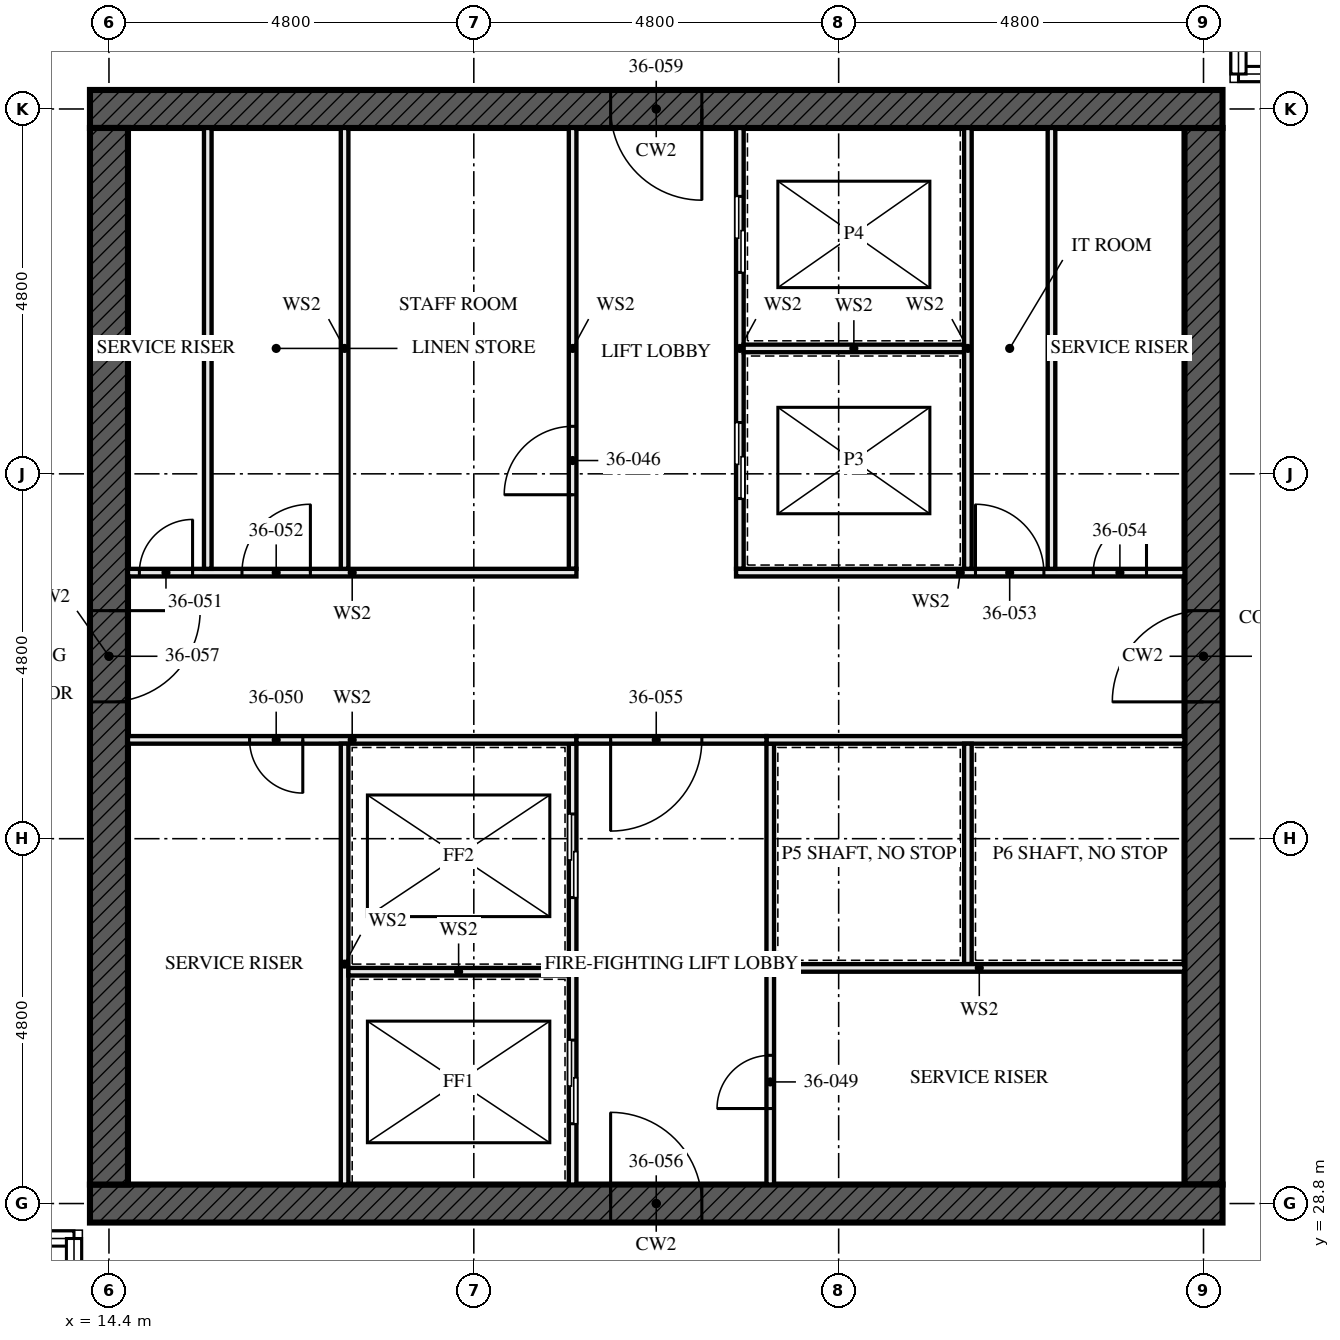
"""IFC4 building model, lengths in metres.
Left out: names, types, materials, properties, quantities, classifications, styles, units other than length and angle.
Written with IfcOpenShell. Run it as: python <this file> out.ifc"""

import sys

from ifc_helpers import new_model, si_unit, direction, frame, frame_2d, origin, place, context, subcontext, project, spatial, rectangle, extrude, element, fill, save


model = new_model("IFC4")
c1 = context("Model", 3, precision=1e-05, world=origin(), true_north=direction((0.0, 1.0)))
c2 = subcontext(c1, "Body", "Model", "MODEL_VIEW")
j1 = project(units=[si_unit("LENGTHUNIT", "METRE"), si_unit("PLANEANGLEUNIT", "RADIAN")], contexts=[c1])
p1 = place(None, origin())
s1 = spatial("IfcSite", under=j1, at=p1, CompositionType="ELEMENT")
p2 = place(p1, origin())
s2 = spatial("IfcBuilding", under=s1, at=p2, CompositionType="ELEMENT")
p3 = place(p2, frame((0.0, 0.0, 133.0)))
s3 = spatial("IfcBuildingStorey", under=s2, at=p3, CompositionType="ELEMENT", Elevation=133.0)
p4 = place(p3, frame((14.15, 28.8, -0.17), z_axis=(0.0, 0.0, 1.0), x_axis=(1.0, 0.0, 0.0)))
e1 = element("IfcWall", 1, at=p4, inside=s3, PredefinedType="SHEAR", context=c2, shape_type="SweptSolid", body=[
    extrude(rectangle(XDim=14.9, YDim=0.5, at=frame_2d((7.45, 0.0))), origin(), (0.0, 0.0, 1.0), 3.42),
])
p5 = place(p4, frame((6.85, 0.0, 0.17)))
e2 = element("IfcOpeningElement", 2, at=p5, cuts=e1, PredefinedType="OPENING", context=c2, shape_type="SweptSolid", body=[
    extrude(rectangle(XDim=1.2, YDim=2.1, at=frame_2d((0.6, 1.05))), frame((0.0, 0.26, 0.0), z_axis=(0.0, -1.0, 0.0), x_axis=(1.0, 0.0, 0.0)), (0.0, 0.0, 1.0), 0.521),
])
p6 = place(p3, frame((29.05, 43.2, -0.17), z_axis=(0.0, 0.0, 1.0), x_axis=(-1.0, 0.0, 0.0)))
e3 = element("IfcWall", 3, at=p6, inside=s3, PredefinedType="SHEAR", context=c2, shape_type="SweptSolid", body=[
    extrude(rectangle(XDim=14.9, YDim=0.5, at=frame_2d((7.45, 0.0))), origin(), (0.0, 0.0, 1.0), 3.42),
])
p7 = place(p6, frame((6.85, 0.0, 0.17)))
e4 = element("IfcOpeningElement", 4, at=p7, cuts=e3, PredefinedType="OPENING", context=c2, shape_type="SweptSolid", body=[
    extrude(rectangle(XDim=1.2, YDim=2.1, at=frame_2d((0.6, 1.05))), frame((0.0, 0.26, 0.0), z_axis=(0.0, -1.0, 0.0), x_axis=(1.0, 0.0, 0.0)), (0.0, 0.0, 1.0), 0.521),
])
p8 = place(p3, frame((14.4, 42.95, -0.17), z_axis=(0.0, 0.0, 1.0), x_axis=(0.0, -1.0, 0.0)))
e5 = element("IfcWall", 5, at=p8, inside=s3, PredefinedType="SHEAR", context=c2, shape_type="SweptSolid", body=[
    extrude(rectangle(XDim=13.9, YDim=0.5, at=frame_2d((6.95, 0.0))), origin(), (0.0, 0.0, 1.0), 3.42),
])
p9 = place(p8, frame((6.35, 0.0, 0.17)))
e6 = element("IfcOpeningElement", 6, at=p9, cuts=e5, PredefinedType="OPENING", context=c2, shape_type="SweptSolid", body=[
    extrude(rectangle(XDim=1.2, YDim=2.1, at=frame_2d((0.6, 1.05))), frame((0.0, 0.26, 0.0), z_axis=(0.0, -1.0, 0.0), x_axis=(1.0, 0.0, 0.0)), (0.0, 0.0, 1.0), 0.521),
])
p10 = place(p3, frame((28.8, 29.05, -0.17), z_axis=(0.0, 0.0, 1.0), x_axis=(0.0, 1.0, 0.0)))
e7 = element("IfcWall", 7, at=p10, inside=s3, PredefinedType="SHEAR", context=c2, shape_type="SweptSolid", body=[
    extrude(rectangle(XDim=13.9, YDim=0.5, at=frame_2d((6.95, 0.0))), origin(), (0.0, 0.0, 1.0), 3.42),
])
p11 = place(p10, frame((6.35, 0.0, 0.17)))
e8 = element("IfcOpeningElement", 8, at=p11, cuts=e7, PredefinedType="OPENING", context=c2, shape_type="SweptSolid", body=[
    extrude(rectangle(XDim=1.2, YDim=2.1, at=frame_2d((0.6, 1.05))), frame((0.0, 0.26, 0.0), z_axis=(0.0, -1.0, 0.0), x_axis=(1.0, 0.0, 0.0)), (0.0, 0.0, 1.0), 0.521),
])
for number, where, z_axis, x_axis in (
    (9, (15.7, 37.15, 0.0), (0.0, 0.0, 1.0), (0.0, 1.0, 0.0)),
    (10, (26.8, 37.15, 0.0), (0.0, 0.0, 1.0), (0.0, 1.0, 0.0)),
):
    element("IfcWall", number, at=place(p3, frame(where, z_axis=z_axis, x_axis=x_axis)), inside=s3, PredefinedType="SOLIDWALL", context=c2, shape_type="SweptSolid", body=[
        extrude(rectangle(XDim=5.8, YDim=0.1, at=frame_2d((2.9, 0.0))), origin(), (0.0, 0.0, 1.0), 3.25),
    ])
p12 = place(p3, frame((20.5, 29.05, 0.0), z_axis=(0.0, 0.0, 1.0), x_axis=(0.0, 1.0, 0.0)))
e11 = element("IfcWall", 11, at=p12, inside=s3, PredefinedType="SOLIDWALL", context=c2, shape_type="SweptSolid", body=[
    extrude(rectangle(XDim=5.8, YDim=0.1, at=frame_2d((2.9, 0.0))), origin(), (0.0, 0.0, 1.0), 3.25),
])
p13 = place(p12, frame((0.8, 0.0, 0.0)))
e12 = element("IfcOpeningElement", 12, at=p13, cuts=e11, PredefinedType="OPENING", context=c2, shape_type="SweptSolid", body=[
    extrude(rectangle(XDim=1.1, YDim=2.3, at=frame_2d((0.55, 1.15))), frame((0.0, 0.061, 0.0), z_axis=(0.0, -1.0, 0.0), x_axis=(1.0, 0.0, 0.0)), (0.0, 0.0, 1.0), 0.121),
])
p14 = place(p12, frame((3.775, 0.0, 0.0)))
e13 = element("IfcOpeningElement", 13, at=p14, cuts=e11, PredefinedType="OPENING", context=c2, shape_type="SweptSolid", body=[
    extrude(rectangle(XDim=1.1, YDim=2.3, at=frame_2d((0.55, 1.15))), frame((0.0, 0.061, 0.0), z_axis=(0.0, -1.0, 0.0), x_axis=(1.0, 0.0, 0.0)), (0.0, 0.0, 1.0), 0.121),
])
p15 = place(p3, frame((20.5, 37.15, 0.0), z_axis=(0.0, 0.0, 1.0), x_axis=(0.0, 1.0, 0.0)))
e14 = element("IfcWall", 14, at=p15, inside=s3, PredefinedType="SOLIDWALL", context=c2, shape_type="SweptSolid", body=[
    extrude(rectangle(XDim=5.8, YDim=0.1, at=frame_2d((2.9, 0.0))), origin(), (0.0, 0.0, 1.0), 3.25),
])
p16 = place(p15, frame((0.975, 0.0, 0.0)))
e15 = element("IfcOpeningElement", 15, at=p16, cuts=e14, PredefinedType="OPENING", context=c2, shape_type="SweptSolid", body=[
    extrude(rectangle(XDim=0.9, YDim=2.1, at=frame_2d((0.45, 1.05))), frame((0.0, 0.061, 0.0), z_axis=(0.0, -1.0, 0.0), x_axis=(1.0, 0.0, 0.0)), (0.0, 0.0, 1.0), 0.121),
])
p17 = place(p3, frame((22.7, 37.15, 0.0), z_axis=(0.0, 0.0, 1.0), x_axis=(0.0, 1.0, 0.0)))
e16 = element("IfcWall", 16, at=p17, inside=s3, PredefinedType="SOLIDWALL", context=c2, shape_type="SweptSolid", body=[
    extrude(rectangle(XDim=5.8, YDim=0.1, at=frame_2d((2.9, 0.0))), origin(), (0.0, 0.0, 1.0), 3.25),
])
p18 = place(p17, frame((0.925, 0.0, 0.0)))
e17 = element("IfcOpeningElement", 17, at=p18, cuts=e16, PredefinedType="OPENING", context=c2, shape_type="SweptSolid", body=[
    extrude(rectangle(XDim=1.0, YDim=2.1, at=frame_2d((0.5, 1.05))), frame((0.0, 0.061, 0.0), z_axis=(0.0, -1.0, 0.0), x_axis=(1.0, 0.0, 0.0)), (0.0, 0.0, 1.0), 0.121),
])
p19 = place(p17, frame((3.9, 0.0, 0.0)))
e18 = element("IfcOpeningElement", 18, at=p19, cuts=e16, PredefinedType="OPENING", context=c2, shape_type="SweptSolid", body=[
    extrude(rectangle(XDim=1.0, YDim=2.1, at=frame_2d((0.5, 1.05))), frame((0.0, 0.061, 0.0), z_axis=(0.0, -1.0, 0.0), x_axis=(1.0, 0.0, 0.0)), (0.0, 0.0, 1.0), 0.121),
])
p20 = place(p3, frame((23.1, 29.05, 0.0), z_axis=(0.0, 0.0, 1.0), x_axis=(0.0, 1.0, 0.0)))
e19 = element("IfcWall", 19, at=p20, inside=s3, PredefinedType="SOLIDWALL", context=c2, shape_type="SweptSolid", body=[
    extrude(rectangle(XDim=5.8, YDim=0.1, at=frame_2d((2.9, 0.0))), origin(), (0.0, 0.0, 1.0), 3.25),
])
p21 = place(p20, frame((1.0, 0.0, 0.0)))
e20 = element("IfcOpeningElement", 20, at=p21, cuts=e19, PredefinedType="OPENING", context=c2, shape_type="SweptSolid", body=[
    extrude(rectangle(XDim=0.7, YDim=2.1, at=frame_2d((0.35, 1.05))), frame((0.0, 0.061, 0.0), z_axis=(0.0, -1.0, 0.0), x_axis=(1.0, 0.0, 0.0)), (0.0, 0.0, 1.0), 0.121),
])
p22 = place(p3, frame((14.65, 34.9, 0.0), z_axis=(0.0, 0.0, 1.0), x_axis=(1.0, 0.0, 0.0)))
e21 = element("IfcWall", 21, at=p22, inside=s3, PredefinedType="SOLIDWALL", context=c2, shape_type="SweptSolid", body=[
    extrude(rectangle(XDim=5.9, YDim=0.1, at=frame_2d((2.95, 0.0))), origin(), (0.0, 0.0, 1.0), 3.25),
])
p23 = place(p22, frame((1.6, 0.0, 0.0)))
e22 = element("IfcOpeningElement", 22, at=p23, cuts=e21, PredefinedType="OPENING", context=c2, shape_type="SweptSolid", body=[
    extrude(rectangle(XDim=0.7, YDim=2.1, at=frame_2d((0.35, 1.05))), frame((0.0, 0.061, 0.0), z_axis=(0.0, -1.0, 0.0), x_axis=(1.0, 0.0, 0.0)), (0.0, 0.0, 1.0), 0.121),
])
p24 = place(p3, frame((23.05, 34.9, 0.0), z_axis=(0.0, 0.0, 1.0), x_axis=(1.0, 0.0, 0.0)))
e23 = element("IfcWall", 23, at=p24, inside=s3, PredefinedType="SOLIDWALL", context=c2, shape_type="SweptSolid", body=[
    extrude(rectangle(XDim=5.5, YDim=0.1, at=frame_2d((2.75, 0.0))), origin(), (0.0, 0.0, 1.0), 3.25),
])
p25 = place(p3, frame((14.65, 37.1, 0.0), z_axis=(0.0, 0.0, 1.0), x_axis=(1.0, 0.0, 0.0)))
e24 = element("IfcWall", 24, at=p25, inside=s3, PredefinedType="SOLIDWALL", context=c2, shape_type="SweptSolid", body=[
    extrude(rectangle(XDim=5.9, YDim=0.1, at=frame_2d((2.95, 0.0))), origin(), (0.0, 0.0, 1.0), 3.25),
])
p26 = place(p25, frame((0.15, 0.0, 0.0)))
e25 = element("IfcOpeningElement", 25, at=p26, cuts=e24, PredefinedType="OPENING", context=c2, shape_type="SweptSolid", body=[
    extrude(rectangle(XDim=0.7, YDim=2.1, at=frame_2d((0.35, 1.05))), frame((0.0, 0.061, 0.0), z_axis=(0.0, -1.0, 0.0), x_axis=(1.0, 0.0, 0.0)), (0.0, 0.0, 1.0), 0.121),
])
p27 = place(p25, frame((1.5, 0.0, 0.0)))
e26 = element("IfcOpeningElement", 26, at=p27, cuts=e24, PredefinedType="OPENING", context=c2, shape_type="SweptSolid", body=[
    extrude(rectangle(XDim=0.9, YDim=2.1, at=frame_2d((0.45, 1.05))), frame((0.0, 0.061, 0.0), z_axis=(0.0, -1.0, 0.0), x_axis=(1.0, 0.0, 0.0)), (0.0, 0.0, 1.0), 0.121),
])
p28 = place(p3, frame((22.65, 37.1, 0.0), z_axis=(0.0, 0.0, 1.0), x_axis=(1.0, 0.0, 0.0)))
e27 = element("IfcWall", 27, at=p28, inside=s3, PredefinedType="SOLIDWALL", context=c2, shape_type="SweptSolid", body=[
    extrude(rectangle(XDim=5.9, YDim=0.1, at=frame_2d((2.95, 0.0))), origin(), (0.0, 0.0, 1.0), 3.25),
])
p29 = place(p28, frame((3.15, 0.0, 0.0)))
e28 = element("IfcOpeningElement", 28, at=p29, cuts=e27, PredefinedType="OPENING", context=c2, shape_type="SweptSolid", body=[
    extrude(rectangle(XDim=0.9, YDim=2.1, at=frame_2d((0.45, 1.05))), frame((0.0, 0.061, 0.0), z_axis=(0.0, -1.0, 0.0), x_axis=(1.0, 0.0, 0.0)), (0.0, 0.0, 1.0), 0.121),
])
p30 = place(p28, frame((4.7, 0.0, 0.0)))
e29 = element("IfcOpeningElement", 29, at=p30, cuts=e27, PredefinedType="OPENING", context=c2, shape_type="SweptSolid", body=[
    extrude(rectangle(XDim=0.7, YDim=2.1, at=frame_2d((0.35, 1.05))), frame((0.0, 0.061, 0.0), z_axis=(0.0, -1.0, 0.0), x_axis=(1.0, 0.0, 0.0)), (0.0, 0.0, 1.0), 0.121),
])
p31 = place(p3, frame((20.55, 34.9, 0.0), z_axis=(0.0, 0.0, 1.0), x_axis=(1.0, 0.0, 0.0)))
e30 = element("IfcWall", 30, at=p31, inside=s3, PredefinedType="SOLIDWALL", context=c2, shape_type="SweptSolid", body=[
    extrude(rectangle(XDim=2.5, YDim=0.1, at=frame_2d((1.25, 0.0))), origin(), (0.0, 0.0, 1.0), 3.25),
])
p32 = place(p31, frame((0.45, 0.0, 0.0)))
e31 = element("IfcOpeningElement", 31, at=p32, cuts=e30, PredefinedType="OPENING", context=c2, shape_type="SweptSolid", body=[
    extrude(rectangle(XDim=1.2, YDim=2.1, at=frame_2d((0.6, 1.05))), frame((0.0, 0.061, 0.0), z_axis=(0.0, -1.0, 0.0), x_axis=(1.0, 0.0, 0.0)), (0.0, 0.0, 1.0), 0.121),
])
p33 = place(p3, frame((17.5, 29.05, 0.0), z_axis=(0.0, 0.0, 1.0), x_axis=(0.0, 1.0, 0.0)))
e32 = element("IfcWall", 32, at=p33, inside=s3, PredefinedType="SOLIDWALL", context=c2, shape_type="SweptSolid", body=[
    extrude(rectangle(XDim=5.8, YDim=0.1, at=frame_2d((2.9, 0.0))), origin(), (0.0, 0.0, 1.0), 3.25),
])
p34 = place(p3, frame((17.55, 31.85, 0.0), z_axis=(0.0, 0.0, 1.0), x_axis=(1.0, 0.0, 0.0)))
e33 = element("IfcWall", 33, at=p34, inside=s3, PredefinedType="SOLIDWALL", context=c2, shape_type="SweptSolid", body=[
    extrude(rectangle(XDim=2.9, YDim=0.1, at=frame_2d((1.45, 0.0))), origin(), (0.0, 0.0, 1.0), 3.25),
])
p35 = place(p3, frame((17.5, 37.15, 0.0), z_axis=(0.0, 0.0, 1.0), x_axis=(0.0, 1.0, 0.0)))
e34 = element("IfcWall", 34, at=p35, inside=s3, PredefinedType="SOLIDWALL", context=c2, shape_type="SweptSolid", body=[
    extrude(rectangle(XDim=5.8, YDim=0.1, at=frame_2d((2.9, 0.0))), origin(), (0.0, 0.0, 1.0), 3.25),
])
p36 = place(p3, frame((22.75, 40.05, 0.0), z_axis=(0.0, 0.0, 1.0), x_axis=(1.0, 0.0, 0.0)))
e35 = element("IfcWall", 35, at=p36, inside=s3, PredefinedType="SOLIDWALL", context=c2, shape_type="SweptSolid", body=[
    extrude(rectangle(XDim=2.9, YDim=0.1, at=frame_2d((1.45, 0.0))), origin(), (0.0, 0.0, 1.0), 3.25),
])
p37 = place(p3, frame((25.7, 37.15, 0.0), z_axis=(0.0, 0.0, 1.0), x_axis=(0.0, 1.0, 0.0)))
e36 = element("IfcWall", 36, at=p37, inside=s3, PredefinedType="SOLIDWALL", context=c2, shape_type="SweptSolid", body=[
    extrude(rectangle(XDim=5.8, YDim=0.1, at=frame_2d((2.9, 0.0))), origin(), (0.0, 0.0, 1.0), 3.25),
])
p38 = place(p3, frame((25.7, 31.95, 0.0), z_axis=(0.0, 0.0, 1.0), x_axis=(0.0, 1.0, 0.0)))
e37 = element("IfcWall", 37, at=p38, inside=s3, PredefinedType="SOLIDWALL", context=c2, shape_type="SweptSolid", body=[
    extrude(rectangle(XDim=2.9, YDim=0.1, at=frame_2d((1.45, 0.0))), origin(), (0.0, 0.0, 1.0), 3.25),
])
p39 = place(p3, frame((23.15, 31.9, 0.0), z_axis=(0.0, 0.0, 1.0), x_axis=(1.0, 0.0, 0.0)))
e38 = element("IfcWall", 38, at=p39, inside=s3, PredefinedType="SOLIDWALL", context=c2, shape_type="SweptSolid", body=[
    extrude(rectangle(XDim=5.4, YDim=0.1, at=frame_2d((2.7, 0.0))), origin(), (0.0, 0.0, 1.0), 3.25),
])
p40 = place(p13, origin())
e39 = element("IfcDoor", 39, at=p40, inside=s3, OperationType="SLIDING_TO_LEFT", PredefinedType="DOOR", context=c2, shape_type="SweptSolid", body=[
    extrude(rectangle(XDim=1.1, YDim=2.3, at=frame_2d((0.55, 1.15))), frame((0.0, 0.05, 0.0), z_axis=(0.0, -1.0, 0.0), x_axis=(1.0, 0.0, 0.0)), (0.0, 0.0, 1.0), 0.1),
])
fill(e12, e39)
p41 = place(p14, origin())
e40 = element("IfcDoor", 40, at=p41, inside=s3, OperationType="SLIDING_TO_LEFT", PredefinedType="DOOR", context=c2, shape_type="SweptSolid", body=[
    extrude(rectangle(XDim=1.1, YDim=2.3, at=frame_2d((0.55, 1.15))), frame((0.0, 0.05, 0.0), z_axis=(0.0, -1.0, 0.0), x_axis=(1.0, 0.0, 0.0)), (0.0, 0.0, 1.0), 0.1),
])
fill(e13, e40)
p42 = place(p16, origin())
e41 = element("IfcDoor", 41, at=p42, inside=s3, OperationType="SINGLE_SWING_RIGHT", PredefinedType="DOOR", context=c2, shape_type="SweptSolid", body=[
    extrude(rectangle(XDim=0.9, YDim=2.1, at=frame_2d((0.45, 1.05))), frame((0.0, 0.027, 0.0), z_axis=(0.0, -1.0, 0.0), x_axis=(1.0, 0.0, 0.0)), (0.0, 0.0, 1.0), 0.054),
])
fill(e15, e41)
p43 = place(p18, origin())
e42 = element("IfcDoor", 42, at=p43, inside=s3, OperationType="SLIDING_TO_LEFT", PredefinedType="DOOR", context=c2, shape_type="SweptSolid", body=[
    extrude(rectangle(XDim=1.0, YDim=2.1, at=frame_2d((0.5, 1.05))), frame((0.0, 0.05, 0.0), z_axis=(0.0, -1.0, 0.0), x_axis=(1.0, 0.0, 0.0)), (0.0, 0.0, 1.0), 0.1),
])
fill(e17, e42)
p44 = place(p19, origin())
e43 = element("IfcDoor", 43, at=p44, inside=s3, OperationType="SLIDING_TO_LEFT", PredefinedType="DOOR", context=c2, shape_type="SweptSolid", body=[
    extrude(rectangle(XDim=1.0, YDim=2.1, at=frame_2d((0.5, 1.05))), frame((0.0, 0.05, 0.0), z_axis=(0.0, -1.0, 0.0), x_axis=(1.0, 0.0, 0.0)), (0.0, 0.0, 1.0), 0.1),
])
fill(e18, e43)
p45 = place(p21, origin())
e44 = element("IfcDoor", 44, at=p45, inside=s3, OperationType="SINGLE_SWING_RIGHT", PredefinedType="DOOR", context=c2, shape_type="SweptSolid", body=[
    extrude(rectangle(XDim=0.7, YDim=2.1, at=frame_2d((0.35, 1.05))), frame((0.0, 0.027, 0.0), z_axis=(0.0, -1.0, 0.0), x_axis=(1.0, 0.0, 0.0)), (0.0, 0.0, 1.0), 0.054),
])
fill(e20, e44)
p46 = place(p23, frame((0.7, 0.0, 0.0), z_axis=(0.0, 0.0, 1.0), x_axis=(-1.0, 0.0, 0.0)))
e45 = element("IfcDoor", 45, at=p46, inside=s3, OperationType="SINGLE_SWING_RIGHT", PredefinedType="DOOR", context=c2, shape_type="SweptSolid", body=[
    extrude(rectangle(XDim=0.7, YDim=2.1, at=frame_2d((0.35, 1.05))), frame((0.0, 0.027, 0.0), z_axis=(0.0, -1.0, 0.0), x_axis=(1.0, 0.0, 0.0)), (0.0, 0.0, 1.0), 0.054),
])
fill(e22, e45)
p47 = place(p26, origin())
e46 = element("IfcDoor", 46, at=p47, inside=s3, OperationType="SINGLE_SWING_LEFT", PredefinedType="DOOR", context=c2, shape_type="SweptSolid", body=[
    extrude(rectangle(XDim=0.7, YDim=2.1, at=frame_2d((0.35, 1.05))), frame((0.0, 0.027, 0.0), z_axis=(0.0, -1.0, 0.0), x_axis=(1.0, 0.0, 0.0)), (0.0, 0.0, 1.0), 0.054),
])
fill(e25, e46)
p48 = place(p27, origin())
e47 = element("IfcDoor", 47, at=p48, inside=s3, OperationType="SINGLE_SWING_LEFT", PredefinedType="DOOR", context=c2, shape_type="SweptSolid", body=[
    extrude(rectangle(XDim=0.9, YDim=2.1, at=frame_2d((0.45, 1.05))), frame((0.0, 0.027, 0.0), z_axis=(0.0, -1.0, 0.0), x_axis=(1.0, 0.0, 0.0)), (0.0, 0.0, 1.0), 0.054),
])
fill(e26, e47)
p49 = place(p29, origin())
e48 = element("IfcDoor", 48, at=p49, inside=s3, OperationType="SINGLE_SWING_RIGHT", PredefinedType="DOOR", context=c2, shape_type="SweptSolid", body=[
    extrude(rectangle(XDim=0.9, YDim=2.1, at=frame_2d((0.45, 1.05))), frame((0.0, 0.027, 0.0), z_axis=(0.0, -1.0, 0.0), x_axis=(1.0, 0.0, 0.0)), (0.0, 0.0, 1.0), 0.054),
])
fill(e28, e48)
p50 = place(p30, origin())
e49 = element("IfcDoor", 49, at=p50, inside=s3, OperationType="SINGLE_SWING_LEFT", PredefinedType="DOOR", context=c2, shape_type="SweptSolid", body=[
    extrude(rectangle(XDim=0.7, YDim=2.1, at=frame_2d((0.35, 1.05))), frame((0.0, 0.027, 0.0), z_axis=(0.0, -1.0, 0.0), x_axis=(1.0, 0.0, 0.0)), (0.0, 0.0, 1.0), 0.054),
])
fill(e29, e49)
p51 = place(p32, frame((1.2, 0.0, 0.0), z_axis=(0.0, 0.0, 1.0), x_axis=(-1.0, 0.0, 0.0)))
e50 = element("IfcDoor", 50, at=p51, inside=s3, OperationType="SINGLE_SWING_LEFT", PredefinedType="DOOR", context=c2, shape_type="SweptSolid", body=[
    extrude(rectangle(XDim=1.2, YDim=2.1, at=frame_2d((0.6, 1.05))), frame((0.0, 0.027, 0.0), z_axis=(0.0, -1.0, 0.0), x_axis=(1.0, 0.0, 0.0)), (0.0, 0.0, 1.0), 0.054),
])
fill(e31, e50)
p52 = place(p5, origin())
e51 = element("IfcDoor", 51, at=p52, inside=s3, OperationType="SINGLE_SWING_LEFT", PredefinedType="DOOR", context=c2, shape_type="SweptSolid", body=[
    extrude(rectangle(XDim=1.2, YDim=2.1, at=frame_2d((0.6, 1.05))), frame((0.0, 0.027, 0.0), z_axis=(0.0, -1.0, 0.0), x_axis=(1.0, 0.0, 0.0)), (0.0, 0.0, 1.0), 0.054),
])
fill(e2, e51)
p53 = place(p9, origin())
e52 = element("IfcDoor", 52, at=p53, inside=s3, OperationType="SINGLE_SWING_LEFT", PredefinedType="DOOR", context=c2, shape_type="SweptSolid", body=[
    extrude(rectangle(XDim=1.2, YDim=2.1, at=frame_2d((0.6, 1.05))), frame((0.0, 0.027, 0.0), z_axis=(0.0, -1.0, 0.0), x_axis=(1.0, 0.0, 0.0)), (0.0, 0.0, 1.0), 0.054),
])
fill(e6, e52)
p54 = place(p11, origin())
e53 = element("IfcDoor", 53, at=p54, inside=s3, OperationType="SINGLE_SWING_LEFT", PredefinedType="DOOR", context=c2, shape_type="SweptSolid", body=[
    extrude(rectangle(XDim=1.2, YDim=2.1, at=frame_2d((0.6, 1.05))), frame((0.0, 0.027, 0.0), z_axis=(0.0, -1.0, 0.0), x_axis=(1.0, 0.0, 0.0)), (0.0, 0.0, 1.0), 0.054),
])
fill(e8, e53)
p55 = place(p7, origin())
e54 = element("IfcDoor", 54, at=p55, inside=s3, OperationType="SINGLE_SWING_LEFT", PredefinedType="DOOR", context=c2, shape_type="SweptSolid", body=[
    extrude(rectangle(XDim=1.2, YDim=2.1, at=frame_2d((0.6, 1.05))), frame((0.0, 0.027, 0.0), z_axis=(0.0, -1.0, 0.0), x_axis=(1.0, 0.0, 0.0)), (0.0, 0.0, 1.0), 0.054),
])
fill(e4, e54)
save(model, sys.argv[1])
